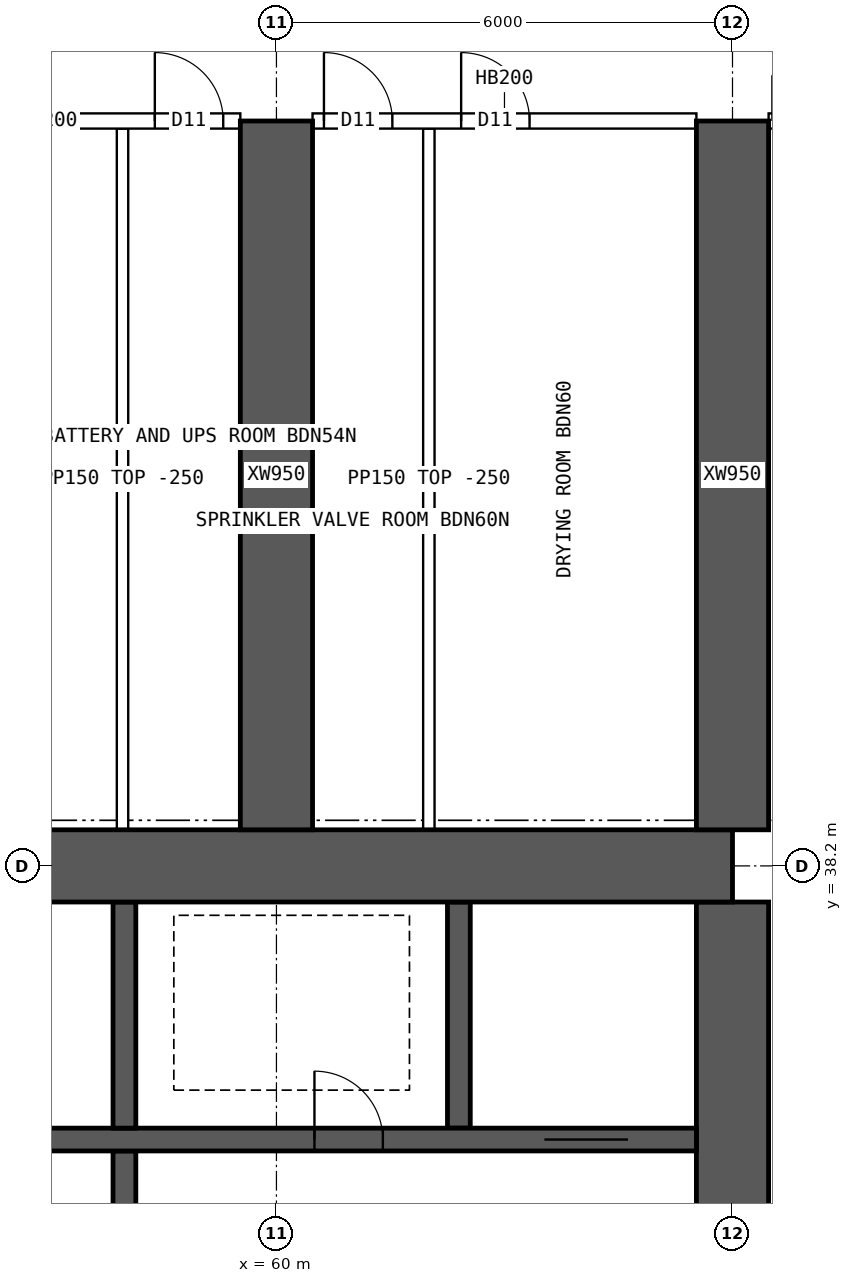
"""IFC4 building model, lengths in metres.
Left out: names, types, materials, properties, quantities, classifications, styles, units other than length and angle.
Written with IfcOpenShell. Run it as: python <this file> out.ifc"""

import sys

from ifc_helpers import new_model, si_unit, direction, frame, frame_2d, origin, place, context, subcontext, project, spatial, rectangle, extrude, element, fill, save


model = new_model("IFC4")
c1 = context("Model", 3, precision=1e-05, world=origin(), true_north=direction((0.0, 1.0)))
c2 = subcontext(c1, "Body", "Model", "MODEL_VIEW")
j1 = project(units=[si_unit("LENGTHUNIT", "METRE"), si_unit("PLANEANGLEUNIT", "RADIAN")], contexts=[c1])
p1 = place(None, origin())
s1 = spatial("IfcSite", under=j1, at=p1, CompositionType="ELEMENT")
p2 = place(p1, origin())
s2 = spatial("IfcBuilding", under=s1, at=p2, CompositionType="ELEMENT")
p3 = place(p2, frame((0.0, 0.0, 84.4)))
s3 = spatial("IfcBuildingStorey", under=s2, at=p3, CompositionType="ELEMENT", Elevation=84.4)
p4 = place(p3, frame((18.0, 38.2, 0.0), z_axis=(0.0, 0.0, 1.0), x_axis=(1.0, 0.0, 0.0)))
e1 = element("IfcWall", 1, at=p4, inside=s3, PredefinedType="SHEAR", context=c2, shape_type="SweptSolid", body=[
    extrude(rectangle(XDim=48.0, YDim=0.95, at=frame_2d((24.0, 0.0))), origin(), (0.0, 0.0, 1.0), 3.75),
])
p5 = place(p3, frame((66.0, 26.275, 0.0), z_axis=(0.0, 0.0, 1.0), x_axis=(0.0, 1.0, 0.0)))
e2 = element("IfcWall", 2, at=p5, inside=s3, PredefinedType="SHEAR", context=c2, shape_type="SweptSolid", body=[
    extrude(rectangle(XDim=11.45, YDim=0.95, at=frame_2d((5.725, 0.0))), origin(), (0.0, 0.0, 1.0), 3.75),
])
p6 = place(p5, frame((5.025, 0.0, 0.0)))
e3 = element("IfcOpeningElement", 3, at=p6, cuts=e2, PredefinedType="OPENING", context=c2, shape_type="SweptSolid", body=[
    extrude(rectangle(XDim=1.2, YDim=2.1, at=frame_2d((0.6, 1.05))), frame((0.0, 0.485, 0.0), z_axis=(0.0, -1.0, 0.0), x_axis=(1.0, 0.0, 0.0)), (0.0, 0.0, 1.0), 0.97),
])
p7 = place(p3, frame((18.475, 34.6, 0.0), z_axis=(0.0, 0.0, 1.0), x_axis=(1.0, 0.0, 0.0)))
e4 = element("IfcWall", 4, at=p7, inside=s3, PredefinedType="SHEAR", context=c2, shape_type="SweptSolid", body=[
    extrude(rectangle(XDim=47.05, YDim=0.3, at=frame_2d((23.525, 0.0))), origin(), (0.0, 0.0, 1.0), 3.75),
])
p8 = place(p7, frame((0.9, 0.0, 0.0)))
e5 = element("IfcOpeningElement", 5, at=p8, cuts=e4, PredefinedType="OPENING", context=c2, shape_type="SweptSolid", body=[
    extrude(rectangle(XDim=1.1, YDim=2.1, at=frame_2d((0.55, 1.05))), frame((0.0, 0.16, 0.0), z_axis=(0.0, -1.0, 0.0), x_axis=(1.0, 0.0, 0.0)), (0.0, 0.0, 1.0), 0.32),
])
p9 = place(p7, frame((45.05, 0.0, 0.0)))
e6 = element("IfcOpeningElement", 6, at=p9, cuts=e4, PredefinedType="OPENING", context=c2, shape_type="SweptSolid", body=[
    extrude(rectangle(XDim=1.1, YDim=2.1, at=frame_2d((0.55, 1.05))), frame((0.0, 0.16, 0.0), z_axis=(0.0, -1.0, 0.0), x_axis=(1.0, 0.0, 0.0)), (0.0, 0.0, 1.0), 0.32),
])
p10 = place(p7, frame((4.125, 0.0, 0.0)))
e7 = element("IfcOpeningElement", 7, at=p10, cuts=e4, PredefinedType="OPENING", context=c2, shape_type="SweptSolid", body=[
    extrude(rectangle(XDim=0.9, YDim=2.1, at=frame_2d((0.45, 1.05))), frame((0.0, 0.16, 0.0), z_axis=(0.0, -1.0, 0.0), x_axis=(1.0, 0.0, 0.0)), (0.0, 0.0, 1.0), 0.32),
])
p11 = place(p7, frame((42.025, 0.0, 0.0)))
e8 = element("IfcOpeningElement", 8, at=p11, cuts=e4, PredefinedType="OPENING", context=c2, shape_type="SweptSolid", body=[
    extrude(rectangle(XDim=0.9, YDim=2.1, at=frame_2d((0.45, 1.05))), frame((0.0, 0.16, 0.0), z_axis=(0.0, -1.0, 0.0), x_axis=(1.0, 0.0, 0.0)), (0.0, 0.0, 1.0), 0.32),
])
p12 = place(p7, frame((8.9, 0.0, 0.0)))
e9 = element("IfcOpeningElement", 9, at=p12, cuts=e4, PredefinedType="OPENING", context=c2, shape_type="SweptSolid", body=[
    extrude(rectangle(XDim=0.9, YDim=2.1, at=frame_2d((0.45, 1.05))), frame((0.0, 0.16, 0.0), z_axis=(0.0, -1.0, 0.0), x_axis=(1.0, 0.0, 0.0)), (0.0, 0.0, 1.0), 0.32),
])
p13 = place(p7, frame((12.874, 0.0, 0.0)))
e10 = element("IfcOpeningElement", 10, at=p13, cuts=e4, PredefinedType="OPENING", context=c2, shape_type="SweptSolid", body=[
    extrude(rectangle(XDim=0.9, YDim=2.1, at=frame_2d((0.45, 1.05))), frame((0.0, 0.16, 0.0), z_axis=(0.0, -1.0, 0.0), x_axis=(1.0, 0.0, 0.0)), (0.0, 0.0, 1.0), 0.32),
])
p14 = place(p7, frame((16.521, 0.0, 0.0)))
e11 = element("IfcOpeningElement", 11, at=p14, cuts=e4, PredefinedType="OPENING", context=c2, shape_type="SweptSolid", body=[
    extrude(rectangle(XDim=0.9, YDim=2.1, at=frame_2d((0.45, 1.05))), frame((0.0, 0.16, 0.0), z_axis=(0.0, -1.0, 0.0), x_axis=(1.0, 0.0, 0.0)), (0.0, 0.0, 1.0), 0.32),
])
p15 = place(p7, frame((20.28, 0.0, 0.0)))
e12 = element("IfcOpeningElement", 12, at=p15, cuts=e4, PredefinedType="OPENING", context=c2, shape_type="SweptSolid", body=[
    extrude(rectangle(XDim=0.9, YDim=2.1, at=frame_2d((0.45, 1.05))), frame((0.0, 0.16, 0.0), z_axis=(0.0, -1.0, 0.0), x_axis=(1.0, 0.0, 0.0)), (0.0, 0.0, 1.0), 0.32),
])
p16 = place(p7, frame((24.686, 0.0, 0.0)))
e13 = element("IfcOpeningElement", 13, at=p16, cuts=e4, PredefinedType="OPENING", context=c2, shape_type="SweptSolid", body=[
    extrude(rectangle(XDim=0.9, YDim=2.1, at=frame_2d((0.45, 1.05))), frame((0.0, 0.16, 0.0), z_axis=(0.0, -1.0, 0.0), x_axis=(1.0, 0.0, 0.0)), (0.0, 0.0, 1.0), 0.32),
])
p17 = place(p7, frame((27.483, 0.0, 0.0)))
e14 = element("IfcOpeningElement", 14, at=p17, cuts=e4, PredefinedType="OPENING", context=c2, shape_type="SweptSolid", body=[
    extrude(rectangle(XDim=0.9, YDim=2.1, at=frame_2d((0.45, 1.05))), frame((0.0, 0.16, 0.0), z_axis=(0.0, -1.0, 0.0), x_axis=(1.0, 0.0, 0.0)), (0.0, 0.0, 1.0), 0.32),
])
p18 = place(p7, frame((33.604, 0.0, 0.0)))
e15 = element("IfcOpeningElement", 15, at=p18, cuts=e4, PredefinedType="OPENING", context=c2, shape_type="SweptSolid", body=[
    extrude(rectangle(XDim=0.9, YDim=2.1, at=frame_2d((0.45, 1.05))), frame((0.0, 0.16, 0.0), z_axis=(0.0, -1.0, 0.0), x_axis=(1.0, 0.0, 0.0)), (0.0, 0.0, 1.0), 0.32),
])
p19 = place(p3, frame((58.0, 30.55, 0.0), z_axis=(0.0, 0.0, 1.0), x_axis=(0.0, 1.0, 0.0)))
e16 = element("IfcWall", 16, at=p19, inside=s3, PredefinedType="SHEAR", context=c2, shape_type="SweptSolid", body=[
    extrude(rectangle(XDim=3.9, YDim=0.3, at=frame_2d((1.95, 0.0))), origin(), (0.0, 0.0, 1.0), 3.75),
])
p20 = place(p19, frame((1.4, 0.0, 0.0)))
e17 = element("IfcOpeningElement", 17, at=p20, cuts=e16, PredefinedType="OPENING", context=c2, shape_type="SweptSolid", body=[
    extrude(rectangle(XDim=1.2, YDim=2.1, at=frame_2d((0.6, 1.05))), frame((0.0, 0.16, 0.0), z_axis=(0.0, -1.0, 0.0), x_axis=(1.0, 0.0, 0.0)), (0.0, 0.0, 1.0), 0.32),
])
for number, where, z_axis, x_axis in (
    (18, (62.4, 34.75, 0.0), (0.0, 0.0, 1.0), (0.0, 1.0, 0.0)),
    (19, (58.0, 34.75, 0.0), (0.0, 0.0, 1.0), (0.0, 1.0, 0.0)),
):
    element("IfcWall", number, at=place(p3, frame(where, z_axis=z_axis, x_axis=x_axis)), inside=s3, PredefinedType="SHEAR", context=c2, shape_type="SweptSolid", body=[
        extrude(rectangle(XDim=2.975, YDim=0.3, at=frame_2d((1.488, 0.0))), origin(), (0.0, 0.0, 1.0), 3.75),
    ])
for number, where, z_axis, x_axis in (
    (20, (60.0, 38.675, 0.0), (0.0, 0.0, 1.0), (0.0, 1.0, 0.0)),
    (21, (66.0, 38.675, 0.0), (0.0, 0.0, 1.0), (0.0, 1.0, 0.0)),
):
    element("IfcWall", number, at=place(p3, frame(where, z_axis=z_axis, x_axis=x_axis)), inside=s3, PredefinedType="SHEAR", context=c2, shape_type="SweptSolid", body=[
        extrude(rectangle(XDim=9.325, YDim=0.95, at=frame_2d((4.663, 0.0))), origin(), (0.0, 0.0, 1.0), 3.75),
    ])
p21 = place(p3, frame((54.475, 48.0, 0.0), z_axis=(0.0, 0.0, 1.0), x_axis=(1.0, 0.0, 0.0)))
e22 = element("IfcWall", 22, at=p21, inside=s3, PredefinedType="SOLIDWALL", context=c2, shape_type="SweptSolid", body=[
    extrude(rectangle(XDim=5.05, YDim=0.2, at=frame_2d((2.525, 0.0))), origin(), (0.0, 0.0, 1.0), 3.5),
])
p22 = place(p21, frame((0.35, 0.0, 0.0)))
e23 = element("IfcOpeningElement", 23, at=p22, cuts=e22, PredefinedType="OPENING", context=c2, shape_type="SweptSolid", body=[
    extrude(rectangle(XDim=0.9, YDim=2.1, at=frame_2d((0.45, 1.05))), frame((0.0, 0.11, 0.0), z_axis=(0.0, -1.0, 0.0), x_axis=(1.0, 0.0, 0.0)), (0.0, 0.0, 1.0), 0.22),
])
p23 = place(p21, frame((3.925, 0.0, 0.0)))
e24 = element("IfcOpeningElement", 24, at=p23, cuts=e22, PredefinedType="OPENING", context=c2, shape_type="SweptSolid", body=[
    extrude(rectangle(XDim=0.9, YDim=2.1, at=frame_2d((0.45, 1.05))), frame((0.0, 0.11, 0.0), z_axis=(0.0, -1.0, 0.0), x_axis=(1.0, 0.0, 0.0)), (0.0, 0.0, 1.0), 0.22),
])
p24 = place(p3, frame((60.475, 48.0, 0.0), z_axis=(0.0, 0.0, 1.0), x_axis=(1.0, 0.0, 0.0)))
e25 = element("IfcWall", 25, at=p24, inside=s3, PredefinedType="SOLIDWALL", context=c2, shape_type="SweptSolid", body=[
    extrude(rectangle(XDim=5.05, YDim=0.2, at=frame_2d((2.525, 0.0))), origin(), (0.0, 0.0, 1.0), 3.5),
])
p25 = place(p24, frame((0.15, 0.0, 0.0)))
e26 = element("IfcOpeningElement", 26, at=p25, cuts=e25, PredefinedType="OPENING", context=c2, shape_type="SweptSolid", body=[
    extrude(rectangle(XDim=0.9, YDim=2.1, at=frame_2d((0.45, 1.05))), frame((0.0, 0.11, 0.0), z_axis=(0.0, -1.0, 0.0), x_axis=(1.0, 0.0, 0.0)), (0.0, 0.0, 1.0), 0.22),
])
p26 = place(p24, frame((1.955, 0.0, 0.0)))
e27 = element("IfcOpeningElement", 27, at=p26, cuts=e25, PredefinedType="OPENING", context=c2, shape_type="SweptSolid", body=[
    extrude(rectangle(XDim=0.9, YDim=2.1, at=frame_2d((0.45, 1.05))), frame((0.0, 0.11, 0.0), z_axis=(0.0, -1.0, 0.0), x_axis=(1.0, 0.0, 0.0)), (0.0, 0.0, 1.0), 0.22),
])
p27 = place(p3, frame((66.475, 48.0, 0.0), z_axis=(0.0, 0.0, 1.0), x_axis=(1.0, 0.0, 0.0)))
e28 = element("IfcWall", 28, at=p27, inside=s3, PredefinedType="SOLIDWALL", context=c2, shape_type="SweptSolid", body=[
    extrude(rectangle(XDim=1.925, YDim=0.2, at=frame_2d((0.962, 0.0))), origin(), (0.0, 0.0, 1.0), 3.5),
])
p28 = place(p27, frame((0.05, 0.0, 0.0)))
e29 = element("IfcOpeningElement", 29, at=p28, cuts=e28, PredefinedType="OPENING", context=c2, shape_type="SweptSolid", body=[
    extrude(rectangle(XDim=1.2, YDim=2.1, at=frame_2d((0.6, 1.05))), frame((0.0, 0.11, 0.0), z_axis=(0.0, -1.0, 0.0), x_axis=(1.0, 0.0, 0.0)), (0.0, 0.0, 1.0), 0.22),
])
for number, where, z_axis, x_axis in (
    (30, (57.975, 38.675, 0.0), (0.0, 0.0, 1.0), (0.0, 1.0, 0.0)),
    (31, (62.005, 38.675, 0.0), (0.0, 0.0, 1.0), (0.0, 1.0, 0.0)),
):
    element("IfcWall", number, at=place(p3, frame(where, z_axis=z_axis, x_axis=x_axis)), inside=s3, PredefinedType="PARTITIONING", context=c2, shape_type="SweptSolid", body=[
        extrude(rectangle(XDim=9.225, YDim=0.15, at=frame_2d((4.612, 0.0))), origin(), (0.0, 0.0, 1.0), 3.5),
    ])
p29 = place(p9, origin())
e32 = element("IfcDoor", 32, at=p29, inside=s3, OperationType="DOUBLE_DOOR_SLIDING", PredefinedType="DOOR", context=c2, shape_type="SweptSolid", body=[
    extrude(rectangle(XDim=1.1, YDim=2.1, at=frame_2d((0.55, 1.05))), frame((0.0, 0.025, 0.0), z_axis=(0.0, -1.0, 0.0), x_axis=(1.0, 0.0, 0.0)), (0.0, 0.0, 1.0), 0.05),
])
fill(e6, e32)
p30 = place(p11, origin())
e33 = element("IfcDoor", 33, at=p30, inside=s3, OperationType="SINGLE_SWING_LEFT", PredefinedType="DOOR", context=c2, shape_type="SweptSolid", body=[
    extrude(rectangle(XDim=0.9, YDim=2.1, at=frame_2d((0.45, 1.05))), frame((0.0, 0.025, 0.0), z_axis=(0.0, -1.0, 0.0), x_axis=(1.0, 0.0, 0.0)), (0.0, 0.0, 1.0), 0.05),
])
fill(e8, e33)
p31 = place(p23, origin())
e34 = element("IfcDoor", 34, at=p31, inside=s3, OperationType="SINGLE_SWING_LEFT", PredefinedType="DOOR", context=c2, shape_type="SweptSolid", body=[
    extrude(rectangle(XDim=0.9, YDim=2.1, at=frame_2d((0.45, 1.05))), frame((0.0, 0.025, 0.0), z_axis=(0.0, -1.0, 0.0), x_axis=(1.0, 0.0, 0.0)), (0.0, 0.0, 1.0), 0.05),
])
fill(e24, e34)
p32 = place(p25, origin())
e35 = element("IfcDoor", 35, at=p32, inside=s3, OperationType="SINGLE_SWING_LEFT", PredefinedType="DOOR", context=c2, shape_type="SweptSolid", body=[
    extrude(rectangle(XDim=0.9, YDim=2.1, at=frame_2d((0.45, 1.05))), frame((0.0, 0.025, 0.0), z_axis=(0.0, -1.0, 0.0), x_axis=(1.0, 0.0, 0.0)), (0.0, 0.0, 1.0), 0.05),
])
fill(e26, e35)
p33 = place(p26, origin())
e36 = element("IfcDoor", 36, at=p33, inside=s3, OperationType="SINGLE_SWING_LEFT", PredefinedType="DOOR", context=c2, shape_type="SweptSolid", body=[
    extrude(rectangle(XDim=0.9, YDim=2.1, at=frame_2d((0.45, 1.05))), frame((0.0, 0.025, 0.0), z_axis=(0.0, -1.0, 0.0), x_axis=(1.0, 0.0, 0.0)), (0.0, 0.0, 1.0), 0.05),
])
fill(e27, e36)
save(model, sys.argv[1])
